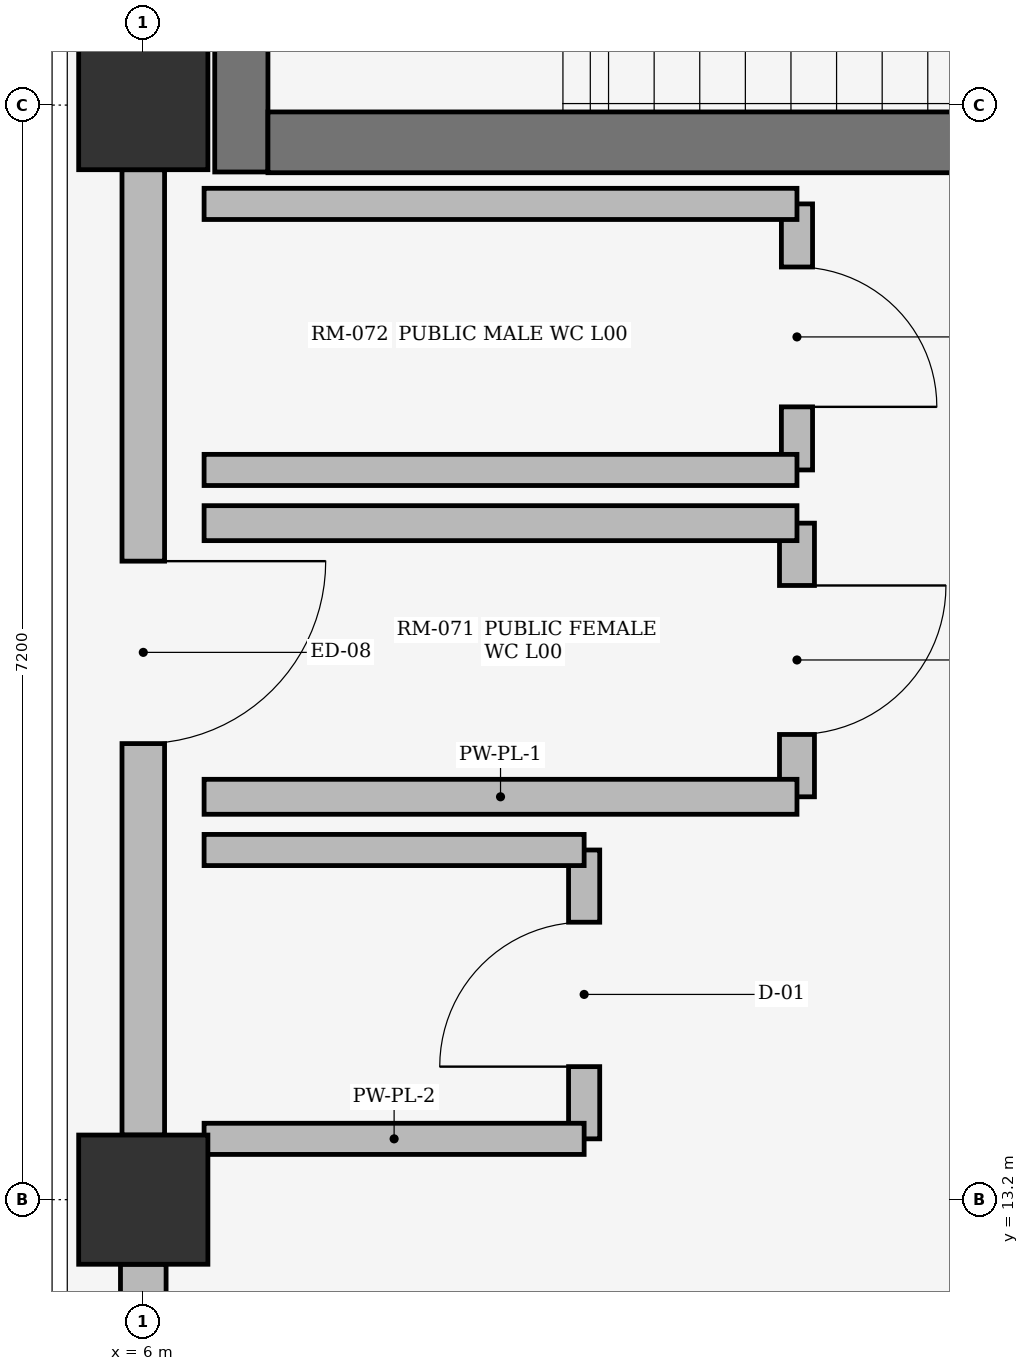
"""IFC4 building model, lengths in metres.
Left out: names, types, materials, properties, quantities, classifications, styles, units other than length and angle.
Written with IfcOpenShell. Run it as: python <this file> out.ifc"""

import sys

from ifc_helpers import new_model, si_unit, direction, frame, frame_2d, origin, origin_2d, place, context, subcontext, project, spatial, rectangle, extrude, element, fill, save


model = new_model("IFC4")
c1 = context("Model", 3, precision=1e-05, world=origin(), true_north=direction((0.0, 1.0)))
c2 = subcontext(c1, "Body", "Model", "MODEL_VIEW")
j1 = project(units=[si_unit("LENGTHUNIT", "METRE"), si_unit("PLANEANGLEUNIT", "RADIAN")], contexts=[c1])
p1 = place(None, origin())
s1 = spatial("IfcSite", under=j1, at=p1, CompositionType="ELEMENT")
p2 = place(p1, origin())
s2 = spatial("IfcBuilding", under=s1, at=p2, CompositionType="ELEMENT")
p3 = place(p2, origin())
s3 = spatial("IfcBuildingStorey", under=s2, at=p3, CompositionType="ELEMENT", Elevation=0.0)
for number, where, z_axis, x_axis in (
    (1, (6.0, 13.2, 0.0), (0.0, 0.0, 1.0), (1.0, 0.0, 0.0)),
    (2, (6.0, 20.4, 0.0), (0.0, 0.0, 1.0), (1.0, 0.0, 0.0)),
):
    element("IfcColumn", number, at=place(p3, frame(where, z_axis=z_axis, x_axis=x_axis)), inside=s3, PredefinedType="COLUMN", context=c2, shape_type="SweptSolid", body=[
        extrude(rectangle(XDim=0.85, YDim=0.85, at=origin_2d()), origin(), (0.0, 0.0, 1.0), 4.48),
    ])
p4 = place(p3, frame((6.0, 6.425, 0.0), z_axis=(0.0, 0.0, 1.0), x_axis=(0.0, 1.0, 0.0)))
e3 = element("IfcWall", 3, at=p4, inside=s3, PredefinedType="STANDARD", context=c2, shape_type="SweptSolid", body=[
    extrude(rectangle(XDim=6.35, YDim=0.3, at=frame_2d((3.175, 0.0))), origin(), (0.0, 0.0, 1.0), 3.66),
])
p5 = place(p4, frame((2.6, 0.0, 0.75)))
e4 = element("IfcOpeningElement", 4, at=p5, cuts=e3, PredefinedType="OPENING", context=c2, shape_type="SweptSolid", body=[
    extrude(rectangle(XDim=1.15, YDim=1.5, at=frame_2d((0.575, 0.75))), frame((0.0, 0.16, 0.0), z_axis=(0.0, -1.0, 0.0), x_axis=(1.0, 0.0, 0.0)), (0.0, 0.0, 1.0), 0.32),
])
p6 = place(p3, frame((6.0, 13.625, 0.0), z_axis=(0.0, 0.0, 1.0), x_axis=(0.0, 1.0, 0.0)))
e5 = element("IfcWall", 5, at=p6, inside=s3, PredefinedType="STANDARD", context=c2, shape_type="SweptSolid", body=[
    extrude(rectangle(XDim=6.35, YDim=0.28, at=frame_2d((3.175, 0.0))), origin(), (0.0, 0.0, 1.0), 3.66),
])
p7 = place(p6, frame((2.575, 0.0, 0.0)))
e6 = element("IfcOpeningElement", 6, at=p7, cuts=e5, PredefinedType="OPENING", context=c2, shape_type="SweptSolid", body=[
    extrude(rectangle(XDim=1.2, YDim=2.15, at=frame_2d((0.6, 1.075))), frame((0.0, 0.15, 0.0), z_axis=(0.0, -1.0, 0.0), x_axis=(1.0, 0.0, 0.0)), (0.0, 0.0, 1.0), 0.3),
])
p8 = place(p3, frame((6.645, 24.55, 0.0), z_axis=(0.0, 0.0, 1.0), x_axis=(0.0, -1.0, 0.0)))
e7 = element("IfcWall", 7, at=p8, inside=s3, PredefinedType="SHEAR", context=c2, shape_type="SweptSolid", body=[
    extrude(rectangle(XDim=4.59, YDim=0.35, at=frame_2d((2.295, 0.0))), origin(), (0.0, 0.0, 1.0), 4.48),
])
p9 = place(p3, frame((14.8, 20.155, 0.0), z_axis=(0.0, 0.0, 1.0), x_axis=(-1.0, 0.0, 0.0)))
e8 = element("IfcWall", 8, at=p9, inside=s3, PredefinedType="SHEAR", context=c2, shape_type="SweptSolid", body=[
    extrude(rectangle(XDim=7.98, YDim=0.4, at=frame_2d((3.99, 0.0))), origin(), (0.0, 0.0, 1.0), 4.48),
])
p10 = place(p3, frame((8.9, 13.6, 0.0), z_axis=(0.0, 0.0, 1.0), x_axis=(0.0, 1.0, 0.0)))
e9 = element("IfcWall", 9, at=p10, inside=s3, PredefinedType="PLUMBINGWALL", context=c2, shape_type="SweptSolid", body=[
    extrude(rectangle(XDim=1.9, YDim=0.205, at=frame_2d((0.95, 0.0))), origin(), (0.0, 0.0, 1.0), 4.46),
])
p11 = place(p10, frame((0.475, 0.0, 0.0)))
e10 = element("IfcOpeningElement", 10, at=p11, cuts=e9, PredefinedType="OPENING", context=c2, shape_type="SweptSolid", body=[
    extrude(rectangle(XDim=0.95, YDim=2.15, at=frame_2d((0.475, 1.075))), frame((0.0, 0.113, 0.0), z_axis=(0.0, -1.0, 0.0), x_axis=(1.0, 0.0, 0.0)), (0.0, 0.0, 1.0), 0.225),
])
for number, where, z_axis, x_axis in (
    (11, (6.4, 13.6, 0.0), (0.0, 0.0, 1.0), (1.0, 0.0, 0.0)),
    (12, (6.4, 15.5, 0.0), (0.0, 0.0, 1.0), (1.0, 0.0, 0.0)),
):
    element("IfcWall", number, at=place(p3, frame(where, z_axis=z_axis, x_axis=x_axis)), inside=s3, PredefinedType="PLUMBINGWALL", context=c2, shape_type="SweptSolid", body=[
        extrude(rectangle(XDim=2.5, YDim=0.205, at=frame_2d((1.25, 0.0))), origin(), (0.0, 0.0, 1.0), 4.46),
    ])
p12 = place(p3, frame((10.3, 15.85, 0.0), z_axis=(0.0, 0.0, 1.0), x_axis=(0.0, 1.0, 0.0)))
e13 = element("IfcWall", 13, at=p12, inside=s3, PredefinedType="PLUMBINGWALL", context=c2, shape_type="SweptSolid", body=[
    extrude(rectangle(XDim=1.8, YDim=0.23, at=frame_2d((0.9, 0.0))), origin(), (0.0, 0.0, 1.0), 4.46),
])
p13 = place(p12, frame((0.41, 0.0, 0.0)))
e14 = element("IfcOpeningElement", 14, at=p13, cuts=e13, PredefinedType="OPENING", context=c2, shape_type="SweptSolid", body=[
    extrude(rectangle(XDim=0.98, YDim=2.1, at=frame_2d((0.49, 1.05))), frame((0.0, 0.125, 0.0), z_axis=(0.0, -1.0, 0.0), x_axis=(1.0, 0.0, 0.0)), (0.0, 0.0, 1.0), 0.25),
])
for number, where, z_axis, x_axis in (
    (15, (6.4, 15.85, 0.0), (0.0, 0.0, 1.0), (1.0, 0.0, 0.0)),
    (16, (6.4, 17.65, 0.0), (0.0, 0.0, 1.0), (1.0, 0.0, 0.0)),
):
    element("IfcWall", number, at=place(p3, frame(where, z_axis=z_axis, x_axis=x_axis)), inside=s3, PredefinedType="PLUMBINGWALL", context=c2, shape_type="SweptSolid", body=[
        extrude(rectangle(XDim=3.9, YDim=0.23, at=frame_2d((1.95, 0.0))), origin(), (0.0, 0.0, 1.0), 4.46),
    ])
p14 = place(p3, frame((10.3, 18.0, 0.0), z_axis=(0.0, 0.0, 1.0), x_axis=(0.0, 1.0, 0.0)))
e17 = element("IfcWall", 17, at=p14, inside=s3, PredefinedType="PLUMBINGWALL", context=c2, shape_type="SweptSolid", body=[
    extrude(rectangle(XDim=1.75, YDim=0.205, at=frame_2d((0.875, 0.0))), origin(), (0.0, 0.0, 1.0), 4.46),
])
p15 = place(p14, frame((0.415, 0.0, 0.0)))
e18 = element("IfcOpeningElement", 18, at=p15, cuts=e17, PredefinedType="OPENING", context=c2, shape_type="SweptSolid", body=[
    extrude(rectangle(XDim=0.92, YDim=2.1, at=frame_2d((0.46, 1.05))), frame((0.0, 0.113, 0.0), z_axis=(0.0, -1.0, 0.0), x_axis=(1.0, 0.0, 0.0)), (0.0, 0.0, 1.0), 0.225),
])
for number, where, z_axis, x_axis in (
    (19, (6.4, 18.0, 0.0), (0.0, 0.0, 1.0), (1.0, 0.0, 0.0)),
    (20, (6.4, 19.75, 0.0), (0.0, 0.0, 1.0), (1.0, 0.0, 0.0)),
):
    element("IfcWall", number, at=place(p3, frame(where, z_axis=z_axis, x_axis=x_axis)), inside=s3, PredefinedType="PLUMBINGWALL", context=c2, shape_type="SweptSolid", body=[
        extrude(rectangle(XDim=3.9, YDim=0.205, at=frame_2d((1.95, 0.0))), origin(), (0.0, 0.0, 1.0), 4.46),
    ])
p16 = place(p7, origin())
e21 = element("IfcDoor", 21, at=p16, inside=s3, OperationType="SINGLE_SWING_RIGHT", PredefinedType="DOOR", context=c2, shape_type="SweptSolid", body=[
    extrude(rectangle(XDim=1.2, YDim=2.15, at=frame_2d((0.6, 1.075))), frame((0.0, 0.025, 0.0), z_axis=(0.0, -1.0, 0.0), x_axis=(1.0, 0.0, 0.0)), (0.0, 0.0, 1.0), 0.05),
])
fill(e6, e21)
p17 = place(p11, origin())
e22 = element("IfcDoor", 22, at=p17, inside=s3, OperationType="SINGLE_SWING_LEFT", PredefinedType="DOOR", context=c2, shape_type="SweptSolid", body=[
    extrude(rectangle(XDim=0.95, YDim=2.15, at=frame_2d((0.475, 1.075))), frame((0.0, 0.025, 0.0), z_axis=(0.0, -1.0, 0.0), x_axis=(1.0, 0.0, 0.0)), (0.0, 0.0, 1.0), 0.05),
])
fill(e10, e22)
p18 = place(p13, origin())
e23 = element("IfcDoor", 23, at=p18, inside=s3, OperationType="SINGLE_SWING_RIGHT", PredefinedType="DOOR", context=c2, shape_type="SweptSolid", body=[
    extrude(rectangle(XDim=0.98, YDim=2.1, at=frame_2d((0.49, 1.05))), frame((0.0, 0.025, 0.0), z_axis=(0.0, -1.0, 0.0), x_axis=(1.0, 0.0, 0.0)), (0.0, 0.0, 1.0), 0.05),
])
fill(e14, e23)
p19 = place(p15, frame((0.92, 0.0, 0.0), z_axis=(0.0, 0.0, 1.0), x_axis=(-1.0, 0.0, 0.0)))
e24 = element("IfcDoor", 24, at=p19, inside=s3, OperationType="SINGLE_SWING_LEFT", PredefinedType="DOOR", context=c2, shape_type="SweptSolid", body=[
    extrude(rectangle(XDim=0.92, YDim=2.1, at=frame_2d((0.46, 1.05))), frame((0.0, 0.025, 0.0), z_axis=(0.0, -1.0, 0.0), x_axis=(1.0, 0.0, 0.0)), (0.0, 0.0, 1.0), 0.05),
])
fill(e18, e24)
save(model, sys.argv[1])
